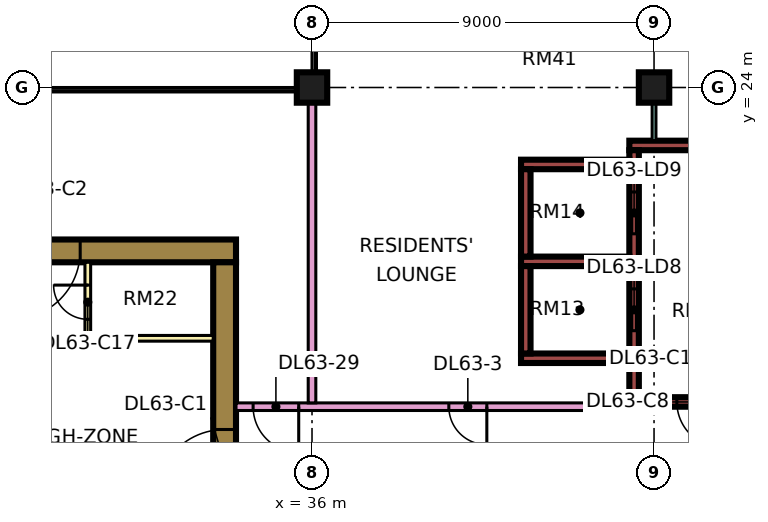
"""IFC4 building model, lengths in metres.
Left out: names, types, materials, properties, quantities, classifications, styles, units other than length and angle.
Written with IfcOpenShell. Run it as: python <this file> out.ifc"""

import sys

from ifc_helpers import new_model, si_unit, direction, frame, frame_2d, origin, origin_2d, place, context, subcontext, project, spatial, rectangle, extrude, element, fill, save


model = new_model("IFC4")
c1 = context("Model", 3, precision=1e-05, world=origin(), true_north=direction((0.0, 1.0)))
c2 = subcontext(c1, "Body", "Model", "MODEL_VIEW")
j1 = project(units=[si_unit("LENGTHUNIT", "METRE"), si_unit("PLANEANGLEUNIT", "RADIAN")], contexts=[c1])
p1 = place(None, origin())
s1 = spatial("IfcSite", under=j1, at=p1, CompositionType="ELEMENT")
p2 = place(p1, origin())
s2 = spatial("IfcBuilding", under=s1, at=p2, CompositionType="ELEMENT")
p3 = place(p2, frame((0.0, 0.0, 273.4)))
s3 = spatial("IfcBuildingStorey", under=s2, at=p3, CompositionType="ELEMENT", Elevation=273.4)
for number, where, z_axis, x_axis in (
    (1, (36.0, 24.0, 0.0), (0.0, 0.0, 1.0), (1.0, 0.0, 0.0)),
    (2, (45.0, 24.0, 0.0), (0.0, 0.0, 1.0), (1.0, 0.0, 0.0)),
):
    element("IfcColumn", number, at=place(p3, frame(where, z_axis=z_axis, x_axis=x_axis)), inside=s3, PredefinedType="COLUMN", context=c2, shape_type="SweptSolid", body=[
        extrude(rectangle(XDim=0.8, YDim=0.8, at=origin_2d()), origin(), (0.0, 0.0, 1.0), 3.75),
    ])
p4 = place(p3, frame((9.0, 19.7, 0.0), z_axis=(0.0, 0.0, 1.0), x_axis=(1.0, 0.0, 0.0)))
e3 = element("IfcWall", 3, at=p4, inside=s3, PredefinedType="SHEAR", context=c2, shape_type="SweptSolid", body=[
    extrude(rectangle(XDim=25.0, YDim=0.6, at=frame_2d((12.5, 0.0))), origin(), (0.0, 0.0, 1.0), 3.75),
])
p5 = place(p4, frame((19.1, 0.0, 0.0)))
e4 = element("IfcOpeningElement", 4, at=p5, cuts=e3, PredefinedType="OPENING", context=c2, shape_type="SweptSolid", body=[
    extrude(rectangle(XDim=1.8, YDim=2.4, at=frame_2d((0.9, 1.2))), frame((0.0, 0.31, 0.0), z_axis=(0.0, -1.0, 0.0), x_axis=(1.0, 0.0, 0.0)), (0.0, 0.0, 1.0), 0.62),
])
p6 = place(p3, frame((33.7, 7.6, 0.0), z_axis=(0.0, 0.0, 1.0), x_axis=(0.0, 1.0, 0.0)))
e5 = element("IfcWall", 5, at=p6, inside=s3, PredefinedType="SHEAR", context=c2, shape_type="SweptSolid", body=[
    extrude(rectangle(XDim=11.8, YDim=0.6, at=frame_2d((5.9, 0.0))), origin(), (0.0, 0.0, 1.0), 3.75),
])
p7 = place(p6, frame((5.6, 0.0, 0.0)))
e6 = element("IfcOpeningElement", 6, at=p7, cuts=e5, PredefinedType="OPENING", context=c2, shape_type="SweptSolid", body=[
    extrude(rectangle(XDim=1.8, YDim=2.4, at=frame_2d((0.9, 1.2))), frame((0.0, 0.31, 0.0), z_axis=(0.0, -1.0, 0.0), x_axis=(1.0, 0.0, 0.0)), (0.0, 0.0, 1.0), 0.62),
])
p8 = place(p3, frame((44.35, 15.725, 0.0), z_axis=(0.0, 0.0, 1.0), x_axis=(1.0, 0.0, 0.0)))
e7 = element("IfcWall", 7, at=p8, inside=s3, PredefinedType="SHEAR", context=c2, shape_type="SweptSolid", body=[
    extrude(rectangle(XDim=3.425, YDim=0.25, at=frame_2d((1.712, 0.0))), origin(), (0.0, 0.0, 1.0), 3.75),
])
p9 = place(p8, frame((1.25, 0.0, 0.0)))
e8 = element("IfcOpeningElement", 8, at=p9, cuts=e7, PredefinedType="OPENING", context=c2, shape_type="SweptSolid", body=[
    extrude(rectangle(XDim=1.2, YDim=2.2, at=frame_2d((0.6, 1.1))), frame((0.0, 0.135, 0.0), z_axis=(0.0, -1.0, 0.0), x_axis=(1.0, 0.0, 0.0)), (0.0, 0.0, 1.0), 0.27),
])
p10 = place(p3, frame((44.35, 22.475, 0.0), z_axis=(0.0, 0.0, 1.0), x_axis=(1.0, 0.0, 0.0)))
e9 = element("IfcWall", 9, at=p10, inside=s3, PredefinedType="SHEAR", context=c2, shape_type="SweptSolid", body=[
    extrude(rectangle(XDim=3.425, YDim=0.25, at=frame_2d((1.712, 0.0))), origin(), (0.0, 0.0, 1.0), 3.75),
])
p11 = place(p3, frame((44.475, 15.85, 0.0), z_axis=(0.0, 0.0, 1.0), x_axis=(0.0, 1.0, 0.0)))
e10 = element("IfcWall", 10, at=p11, inside=s3, PredefinedType="SHEAR", context=c2, shape_type="SweptSolid", body=[
    extrude(rectangle(XDim=6.5, YDim=0.25, at=frame_2d((3.25, 0.0))), origin(), (0.0, 0.0, 1.0), 3.75),
])
p12 = place(p11, frame((1.75, 0.0, 0.0)))
e11 = element("IfcOpeningElement", 11, at=p12, cuts=e10, PredefinedType="OPENING", context=c2, shape_type="SweptSolid", body=[
    extrude(rectangle(XDim=1.1, YDim=2.2, at=frame_2d((0.55, 1.1))), frame((0.0, 0.135, 0.0), z_axis=(0.0, -1.0, 0.0), x_axis=(1.0, 0.0, 0.0)), (0.0, 0.0, 1.0), 0.27),
])
p13 = place(p11, frame((4.3, 0.0, 0.0)))
e12 = element("IfcOpeningElement", 12, at=p13, cuts=e10, PredefinedType="OPENING", context=c2, shape_type="SweptSolid", body=[
    extrude(rectangle(XDim=1.1, YDim=2.2, at=frame_2d((0.55, 1.1))), frame((0.0, 0.135, 0.0), z_axis=(0.0, -1.0, 0.0), x_axis=(1.0, 0.0, 0.0)), (0.0, 0.0, 1.0), 0.27),
])
for number, where, z_axis, x_axis in (
    (13, (41.5, 16.875, 0.0), (0.0, 0.0, 1.0), (1.0, 0.0, 0.0)),
    (14, (41.5, 19.425, 0.0), (0.0, 0.0, 1.0), (1.0, 0.0, 0.0)),
    (15, (41.5, 21.975, 0.0), (0.0, 0.0, 1.0), (1.0, 0.0, 0.0)),
):
    element("IfcWall", number, at=place(p3, frame(where, z_axis=z_axis, x_axis=x_axis)), inside=s3, PredefinedType="SHEAR", context=c2, shape_type="SweptSolid", body=[
        extrude(rectangle(XDim=2.85, YDim=0.25, at=frame_2d((1.425, 0.0))), origin(), (0.0, 0.0, 1.0), 3.75),
    ])
for number, where, z_axis, x_axis in (
    (16, (41.625, 17.0, 0.0), (0.0, 0.0, 1.0), (0.0, 1.0, 0.0)),
    (17, (41.625, 19.55, 0.0), (0.0, 0.0, 1.0), (0.0, 1.0, 0.0)),
):
    element("IfcWall", number, at=place(p3, frame(where, z_axis=z_axis, x_axis=x_axis)), inside=s3, PredefinedType="SHEAR", context=c2, shape_type="SweptSolid", body=[
        extrude(rectangle(XDim=2.3, YDim=0.25, at=frame_2d((1.15, 0.0))), origin(), (0.0, 0.0, 1.0), 3.75),
    ])
p14 = place(p3, frame((30.1, 17.4, 0.0), z_axis=(0.0, 0.0, 1.0), x_axis=(0.0, 1.0, 0.0)))
e18 = element("IfcWall", 18, at=p14, inside=s3, PredefinedType="PARTITIONING", context=c2, shape_type="SweptSolid", body=[
    extrude(rectangle(XDim=2.0, YDim=0.15, at=frame_2d((1.0, 0.0))), origin(), (0.0, 0.0, 1.0), 3.35),
])
p15 = place(p14, frame((0.5, 0.0, 0.0)))
e19 = element("IfcOpeningElement", 19, at=p15, cuts=e18, PredefinedType="OPENING", context=c2, shape_type="SweptSolid", body=[
    extrude(rectangle(XDim=0.9, YDim=2.1, at=frame_2d((0.45, 1.05))), frame((0.0, 0.085, 0.0), z_axis=(0.0, -1.0, 0.0), x_axis=(1.0, 0.0, 0.0)), (0.0, 0.0, 1.0), 0.17),
])
p16 = place(p3, frame((30.1, 17.4, 0.0), z_axis=(0.0, 0.0, 1.0), x_axis=(1.0, 0.0, 0.0)))
e20 = element("IfcWall", 20, at=p16, inside=s3, PredefinedType="PARTITIONING", context=c2, shape_type="SweptSolid", body=[
    extrude(rectangle(XDim=3.3, YDim=0.15, at=frame_2d((1.65, 0.0))), origin(), (0.0, 0.0, 1.0), 3.35),
])
p17 = place(p3, frame((34.0, 15.6, 0.0), z_axis=(0.0, 0.0, 1.0), x_axis=(1.0, 0.0, 0.0)))
e21 = element("IfcWall", 21, at=p17, inside=s3, PredefinedType="PARTITIONING", context=c2, shape_type="SweptSolid", body=[
    extrude(rectangle(XDim=10.35, YDim=0.2, at=frame_2d((5.175, 0.0))), origin(), (0.0, 0.0, 1.0), 3.35),
])
p18 = place(p17, frame((5.6, 0.0, 0.0)))
e22 = element("IfcOpeningElement", 22, at=p18, cuts=e21, PredefinedType="OPENING", context=c2, shape_type="SweptSolid", body=[
    extrude(rectangle(XDim=1.0, YDim=2.1, at=frame_2d((0.5, 1.05))), frame((0.0, 0.11, 0.0), z_axis=(0.0, -1.0, 0.0), x_axis=(1.0, 0.0, 0.0)), (0.0, 0.0, 1.0), 0.22),
])
p19 = place(p17, frame((0.45, 0.0, 0.0)))
e23 = element("IfcOpeningElement", 23, at=p19, cuts=e21, PredefinedType="OPENING", context=c2, shape_type="SweptSolid", body=[
    extrude(rectangle(XDim=1.2, YDim=2.1, at=frame_2d((0.6, 1.05))), frame((0.0, 0.11, 0.0), z_axis=(0.0, -1.0, 0.0), x_axis=(1.0, 0.0, 0.0)), (0.0, 0.0, 1.0), 0.22),
])
p20 = place(p3, frame((36.0, 15.7, 0.0), z_axis=(0.0, 0.0, 1.0), x_axis=(0.0, 1.0, 0.0)))
e24 = element("IfcWall", 24, at=p20, inside=s3, PredefinedType="PARTITIONING", context=c2, shape_type="SweptSolid", body=[
    extrude(rectangle(XDim=8.3, YDim=0.2, at=frame_2d((4.15, 0.0))), origin(), (0.0, 0.0, 1.0), 3.35),
])
p21 = place(p3, frame((45.0, 22.6, 0.0), z_axis=(0.0, 0.0, 1.0), x_axis=(0.0, 1.0, 0.0)))
e25 = element("IfcWall", 25, at=p21, inside=s3, PredefinedType="PARTITIONING", context=c2, shape_type="SweptSolid", body=[
    extrude(rectangle(XDim=1.4, YDim=0.1, at=frame_2d((0.7, 0.0))), origin(), (0.0, 0.0, 1.0), 3.35),
])
p22 = place(p7, origin())
e26 = element("IfcDoor", 26, at=p22, inside=s3, OperationType="DOUBLE_DOOR_SINGLE_SWING", PredefinedType="DOOR", context=c2, shape_type="SweptSolid", body=[
    extrude(rectangle(XDim=1.8, YDim=2.4, at=frame_2d((0.9, 1.2))), frame((0.0, 0.025, 0.0), z_axis=(0.0, -1.0, 0.0), x_axis=(1.0, 0.0, 0.0)), (0.0, 0.0, 1.0), 0.05),
])
fill(e6, e26)
p23 = place(p5, frame((1.8, 0.0, 0.0), z_axis=(0.0, 0.0, 1.0), x_axis=(-1.0, 0.0, 0.0)))
e27 = element("IfcDoor", 27, at=p23, inside=s3, OperationType="DOUBLE_DOOR_SINGLE_SWING", PredefinedType="DOOR", context=c2, shape_type="SweptSolid", body=[
    extrude(rectangle(XDim=1.8, YDim=2.4, at=frame_2d((0.9, 1.2))), frame((0.0, 0.025, 0.0), z_axis=(0.0, -1.0, 0.0), x_axis=(1.0, 0.0, 0.0)), (0.0, 0.0, 1.0), 0.05),
])
fill(e4, e27)
p24 = place(p9, origin())
e28 = element("IfcDoor", 28, at=p24, inside=s3, OperationType="SINGLE_SWING_RIGHT", PredefinedType="DOOR", context=c2, shape_type="SweptSolid", body=[
    extrude(rectangle(XDim=1.2, YDim=2.2, at=frame_2d((0.6, 1.1))), frame((0.0, 0.025, 0.0), z_axis=(0.0, -1.0, 0.0), x_axis=(1.0, 0.0, 0.0)), (0.0, 0.0, 1.0), 0.05),
])
fill(e8, e28)
p25 = place(p12, origin())
e29 = element("IfcDoor", 29, at=p25, inside=s3, OperationType="DOUBLE_DOOR_SLIDING", PredefinedType="DOOR", context=c2, shape_type="SweptSolid", body=[
    extrude(rectangle(XDim=1.1, YDim=2.2, at=frame_2d((0.55, 1.1))), frame((0.0, 0.025, 0.0), z_axis=(0.0, -1.0, 0.0), x_axis=(1.0, 0.0, 0.0)), (0.0, 0.0, 1.0), 0.05),
])
fill(e11, e29)
p26 = place(p13, origin())
e30 = element("IfcDoor", 30, at=p26, inside=s3, OperationType="DOUBLE_DOOR_SLIDING", PredefinedType="DOOR", context=c2, shape_type="SweptSolid", body=[
    extrude(rectangle(XDim=1.1, YDim=2.2, at=frame_2d((0.55, 1.1))), frame((0.0, 0.025, 0.0), z_axis=(0.0, -1.0, 0.0), x_axis=(1.0, 0.0, 0.0)), (0.0, 0.0, 1.0), 0.05),
])
fill(e12, e30)
p27 = place(p15, frame((0.9, 0.0, 0.0), z_axis=(0.0, 0.0, 1.0), x_axis=(-1.0, 0.0, 0.0)))
e31 = element("IfcDoor", 31, at=p27, inside=s3, OperationType="SINGLE_SWING_RIGHT", PredefinedType="DOOR", context=c2, shape_type="SweptSolid", body=[
    extrude(rectangle(XDim=0.9, YDim=2.1, at=frame_2d((0.45, 1.05))), frame((0.0, 0.025, 0.0), z_axis=(0.0, -1.0, 0.0), x_axis=(1.0, 0.0, 0.0)), (0.0, 0.0, 1.0), 0.05),
])
fill(e19, e31)
p28 = place(p18, origin())
e32 = element("IfcDoor", 32, at=p28, inside=s3, OperationType="SINGLE_SWING_RIGHT", PredefinedType="DOOR", context=c2, shape_type="SweptSolid", body=[
    extrude(rectangle(XDim=1.0, YDim=2.1, at=frame_2d((0.5, 1.05))), frame((0.0, 0.025, 0.0), z_axis=(0.0, -1.0, 0.0), x_axis=(1.0, 0.0, 0.0)), (0.0, 0.0, 1.0), 0.05),
])
fill(e22, e32)
p29 = place(p19, origin())
e33 = element("IfcDoor", 33, at=p29, inside=s3, OperationType="SINGLE_SWING_RIGHT", PredefinedType="DOOR", context=c2, shape_type="SweptSolid", body=[
    extrude(rectangle(XDim=1.2, YDim=2.1, at=frame_2d((0.6, 1.05))), frame((0.0, 0.025, 0.0), z_axis=(0.0, -1.0, 0.0), x_axis=(1.0, 0.0, 0.0)), (0.0, 0.0, 1.0), 0.05),
])
fill(e23, e33)
save(model, sys.argv[1])
